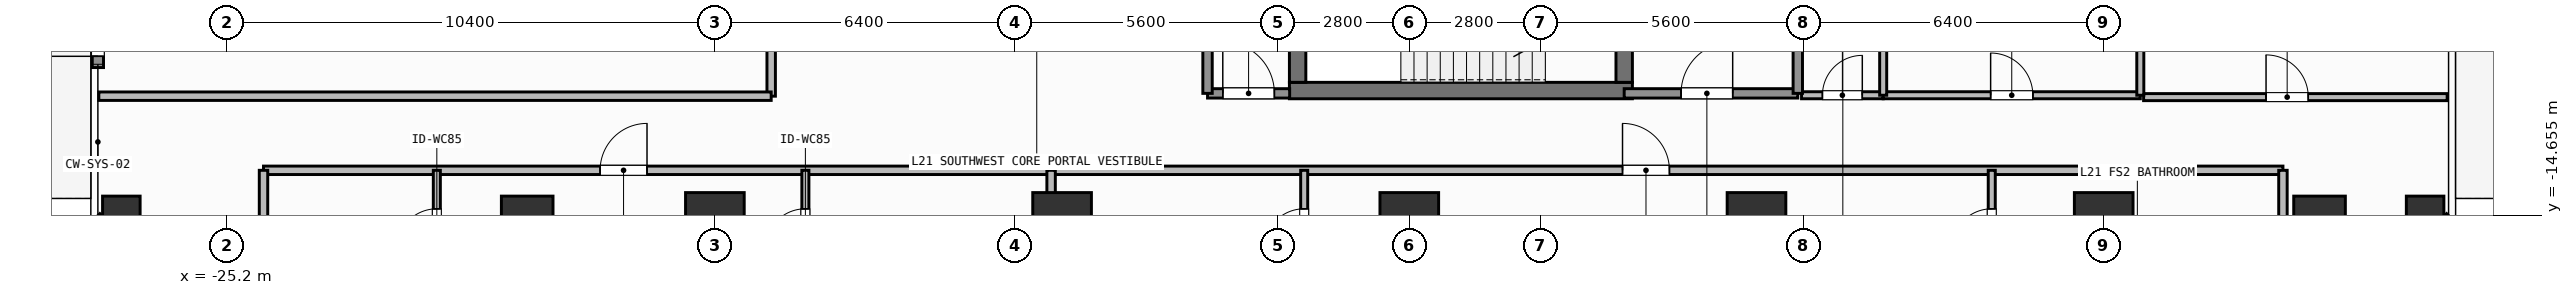
"""IFC4 building model, lengths in metres.
Left out: names, types, materials, properties, quantities, classifications, styles, units other than length and angle.
Written with IfcOpenShell. Run it as: python <this file> out.ifc"""

import sys

from ifc_helpers import new_model, si_unit, direction, frame, frame_2d, origin, origin_2d, place, context, subcontext, project, spatial, rectangle, hollow_rectangle, extrude, element, fill, save


model = new_model("IFC4")
c1 = context("Model", 3, precision=1e-05, world=origin(), true_north=direction((0.0, 1.0)))
c2 = subcontext(c1, "Body", "Model", "MODEL_VIEW")
j1 = project(units=[si_unit("LENGTHUNIT", "METRE"), si_unit("PLANEANGLEUNIT", "RADIAN")], contexts=[c1])
p1 = place(None, origin())
s1 = spatial("IfcSite", under=j1, at=p1, CompositionType="ELEMENT")
p2 = place(p1, origin())
s2 = spatial("IfcBuilding", under=s1, at=p2, CompositionType="ELEMENT")
p3 = place(p2, frame((0.0, 0.0, 85.2)))
s3 = spatial("IfcBuildingStorey", under=s2, at=p3, CompositionType="ELEMENT", Elevation=85.2)
p4 = place(p3, frame((-2.555, -12.0, 0.0), z_axis=(0.0, 0.0, 1.0), x_axis=(1.0, 0.0, 0.0)))
e1 = element("IfcWall", 1, at=p4, inside=s3, PredefinedType="SHEAR", context=c2, shape_type="SweptSolid", body=[
    extrude(rectangle(XDim=7.31, YDim=0.35, at=frame_2d((3.655, 0.0))), origin(), (0.0, 0.0, 1.0), 3.9),
])
p5 = place(p3, frame((-2.38, -11.825, 0.0), z_axis=(0.0, 0.0, 1.0), x_axis=(0.0, 1.0, 0.0)))
e2 = element("IfcWall", 2, at=p5, inside=s3, PredefinedType="SHEAR", context=c2, shape_type="SweptSolid", body=[
    extrude(rectangle(XDim=2.925, YDim=0.35, at=frame_2d((1.462, 0.0))), origin(), (0.0, 0.0, 1.0), 3.9),
])
p6 = place(p3, frame((4.58, -8.9, 0.0), z_axis=(0.0, 0.0, 1.0), x_axis=(0.0, -1.0, 0.0)))
e3 = element("IfcWall", 3, at=p6, inside=s3, PredefinedType="SHEAR", context=c2, shape_type="SweptSolid", body=[
    extrude(rectangle(XDim=2.925, YDim=0.35, at=frame_2d((1.462, 0.0))), origin(), (0.0, 0.0, 1.0), 3.9),
])
p7 = place(p6, frame((0.913, 0.0, 0.0)))
e4 = element("IfcOpeningElement", 4, at=p7, cuts=e3, PredefinedType="OPENING", context=c2, shape_type="SweptSolid", body=[
    extrude(rectangle(XDim=1.1, YDim=2.15, at=frame_2d((0.55, 1.075))), frame((0.0, 0.185, 0.0), z_axis=(0.0, -1.0, 0.0), x_axis=(1.0, 0.0, 0.0)), (0.0, 0.0, 1.0), 0.37),
])
for number, where, z_axis, x_axis in (
    (5, (-14.8, -14.8, 0.0), (0.0, 0.0, 1.0), (1.0, 0.0, 0.0)),
    (6, (-7.4, -14.8, 0.0), (0.0, 0.0, 1.0), (1.0, 0.0, 0.0)),
    (7, (0.0, -14.8, 0.0), (0.0, 0.0, 1.0), (1.0, 0.0, 0.0)),
    (8, (7.4, -14.8, 0.0), (0.0, 0.0, 1.0), (1.0, 0.0, 0.0)),
    (9, (14.8, -14.8, 0.0), (0.0, 0.0, 1.0), (1.0, 0.0, 0.0)),
):
    element("IfcColumn", number, at=place(p3, frame(where, z_axis=z_axis, x_axis=x_axis)), inside=s3, PredefinedType="COLUMN", context=c2, shape_type="SweptSolid", body=[
        extrude(rectangle(XDim=1.25, YDim=1.25, at=origin_2d()), origin(), (0.0, 0.0, 1.0), 3.9),
    ])
for number, where, z_axis, x_axis in (
    (10, (-18.8, -14.8, 0.0), (0.0, 0.0, 1.0), (1.0, 0.0, 0.0)),
    (11, (19.4, -14.8, 0.0), (0.0, 0.0, 1.0), (1.0, 0.0, 0.0)),
):
    element("IfcColumn", number, at=place(p3, frame(where, z_axis=z_axis, x_axis=x_axis)), inside=s3, PredefinedType="COLUMN", context=c2, shape_type="SweptSolid", body=[
        extrude(rectangle(XDim=1.1, YDim=1.1, at=origin_2d()), origin(), (0.0, 0.0, 1.0), 3.9),
    ])
for number, where, z_axis, x_axis in (
    (12, (-27.45, -14.65, 0.0), (0.0, 0.0, 1.0), (1.0, 0.0, 0.0)),
    (13, (21.65, -14.65, 0.0), (0.0, 0.0, 1.0), (1.0, 0.0, 0.0)),
):
    element("IfcColumn", number, at=place(p3, frame(where, z_axis=z_axis, x_axis=x_axis)), inside=s3, PredefinedType="COLUMN", context=c2, shape_type="SweptSolid", body=[
        extrude(hollow_rectangle(XDim=0.8, YDim=0.8, WallThickness=0.036, at=origin_2d()), origin(), (0.0, 0.0, 1.0), 3.9),
    ])
p8 = place(p3, frame((-27.95, -11.51, 0.0), z_axis=(0.0, 0.0, 1.0), x_axis=(0.0, 1.0, 0.0)))
e14 = element("IfcWall", 14, at=p8, inside=s3, PredefinedType="SOLIDWALL", context=c2, shape_type="SweptSolid", body=[
    extrude(rectangle(XDim=1.58, YDim=0.24, at=frame_2d((0.79, 0.0))), origin(), (0.0, 0.0, 1.0), 3.68),
])
p9 = place(p8, frame((0.24, 0.0, 0.0)))
e15 = element("IfcOpeningElement", 15, at=p9, cuts=e14, PredefinedType="OPENING", context=c2, shape_type="SweptSolid", body=[
    extrude(rectangle(XDim=1.1, YDim=2.2, at=frame_2d((0.55, 1.1))), frame((0.0, 0.13, 0.0), z_axis=(0.0, -1.0, 0.0), x_axis=(1.0, 0.0, 0.0)), (0.0, 0.0, 1.0), 0.26),
])
p10 = place(p3, frame((-23.408, -19.292, 0.0), z_axis=(0.0, 0.0, 1.0), x_axis=(-0.707087954376, 0.707125607496, 0.0)))
e16 = element("IfcWall", 16, at=p10, inside=s3, PredefinedType="SOLIDWALL", context=c2, shape_type="SweptSolid", body=[
    extrude(rectangle(XDim=6.484, YDim=0.24, at=frame_2d((3.242, 0.0))), origin(), (0.0, 0.0, 1.0), 3.68),
])
p11 = place(p10, frame((2.492, 0.0, 0.8)))
e17 = element("IfcOpeningElement", 17, at=p11, cuts=e16, PredefinedType="OPENING", context=c2, shape_type="SweptSolid", body=[
    extrude(rectangle(XDim=1.5, YDim=1.85, at=frame_2d((0.75, 0.925))), frame((0.0, 0.13, 0.0), z_axis=(0.0, -1.0, 0.0), x_axis=(1.0, 0.0, 0.0)), (0.0, 0.0, 1.0), 0.26),
])
p12 = place(p3, frame((22.192, -14.708, 0.0), z_axis=(0.0, 0.0, 1.0), x_axis=(-0.707087954376, -0.707125607496, 0.0)))
e18 = element("IfcWall", 18, at=p12, inside=s3, PredefinedType="SOLIDWALL", context=c2, shape_type="SweptSolid", body=[
    extrude(rectangle(XDim=6.484, YDim=0.24, at=frame_2d((3.242, 0.0))), origin(), (0.0, 0.0, 1.0), 3.68),
])
p13 = place(p12, frame((2.492, 0.0, 0.8)))
e19 = element("IfcOpeningElement", 19, at=p13, cuts=e18, PredefinedType="OPENING", context=c2, shape_type="SweptSolid", body=[
    extrude(rectangle(XDim=1.5, YDim=1.85, at=frame_2d((0.75, 0.925))), frame((0.0, 0.13, 0.0), z_axis=(0.0, -1.0, 0.0), x_axis=(1.0, 0.0, 0.0)), (0.0, 0.0, 1.0), 0.26),
])
p14 = place(p3, frame((4.58, -12.06, 0.0), z_axis=(0.0, 0.0, 1.0), x_axis=(1.0, 0.0, 0.0)))
e20 = element("IfcWall", 20, at=p14, inside=s3, PredefinedType="SOLIDWALL", context=c2, shape_type="SweptSolid", body=[
    extrude(rectangle(XDim=3.7, YDim=0.2, at=frame_2d((1.85, 0.0))), origin(), (0.0, 0.0, 1.0), 3.68),
])
p15 = place(p14, frame((1.212, 0.0, 0.0)))
e21 = element("IfcOpeningElement", 21, at=p15, cuts=e20, PredefinedType="OPENING", context=c2, shape_type="SweptSolid", body=[
    extrude(rectangle(XDim=1.1, YDim=2.15, at=frame_2d((0.55, 1.075))), frame((0.0, 0.11, 0.0), z_axis=(0.0, -1.0, 0.0), x_axis=(1.0, 0.0, 0.0)), (0.0, 0.0, 1.0), 0.22),
])
p16 = place(p3, frame((-4.3, -12.06, 0.0), z_axis=(0.0, 0.0, 1.0), x_axis=(1.0, 0.0, 0.0)))
e22 = element("IfcWall", 22, at=p16, inside=s3, PredefinedType="SOLIDWALL", context=c2, shape_type="SweptSolid", body=[
    extrude(rectangle(XDim=1.75, YDim=0.2, at=frame_2d((0.875, 0.0))), origin(), (0.0, 0.0, 1.0), 3.68),
])
p17 = place(p16, frame((0.325, 0.0, 0.0)))
e23 = element("IfcOpeningElement", 23, at=p17, cuts=e22, PredefinedType="OPENING", context=c2, shape_type="SweptSolid", body=[
    extrude(rectangle(XDim=1.1, YDim=2.15, at=frame_2d((0.55, 1.075))), frame((0.0, 0.11, 0.0), z_axis=(0.0, -1.0, 0.0), x_axis=(1.0, 0.0, 0.0)), (0.0, 0.0, 1.0), 0.22),
])
p18 = place(p3, frame((8.36, -12.1, 0.0), z_axis=(0.0, 0.0, 1.0), x_axis=(1.0, 0.0, 0.0)))
e24 = element("IfcWall", 24, at=p18, inside=s3, PredefinedType="PARTITIONING", context=c2, shape_type="SweptSolid", body=[
    extrude(rectangle(XDim=1.74, YDim=0.15, at=frame_2d((0.87, 0.0))), origin(), (0.0, 0.0, 1.0), 3.68),
])
p19 = place(p18, frame((0.445, 0.0, 0.0)))
e25 = element("IfcOpeningElement", 25, at=p19, cuts=e24, PredefinedType="OPENING", context=c2, shape_type="SweptSolid", body=[
    extrude(rectangle(XDim=0.85, YDim=2.1, at=frame_2d((0.425, 1.05))), frame((0.0, 0.085, 0.0), z_axis=(0.0, -1.0, 0.0), x_axis=(1.0, 0.0, 0.0)), (0.0, 0.0, 1.0), 0.17),
])
p20 = place(p3, frame((10.1, -12.1, 0.0), z_axis=(0.0, 0.0, 1.0), x_axis=(1.0, 0.0, 0.0)))
e26 = element("IfcWall", 26, at=p20, inside=s3, PredefinedType="PARTITIONING", context=c2, shape_type="SweptSolid", body=[
    extrude(rectangle(XDim=5.48, YDim=0.15, at=frame_2d((2.74, 0.0))), origin(), (0.0, 0.0, 1.0), 3.68),
])
p21 = place(p20, frame((2.29, 0.0, 0.0)))
e27 = element("IfcOpeningElement", 27, at=p21, cuts=e26, PredefinedType="OPENING", context=c2, shape_type="SweptSolid", body=[
    extrude(rectangle(XDim=0.9, YDim=2.1, at=frame_2d((0.45, 1.05))), frame((0.0, 0.085, 0.0), z_axis=(0.0, -1.0, 0.0), x_axis=(1.0, 0.0, 0.0)), (0.0, 0.0, 1.0), 0.17),
])
p22 = place(p3, frame((-24.42, -13.7, 0.0), z_axis=(0.0, 0.0, 1.0), x_axis=(1.0, 0.0, 0.0)))
e28 = element("IfcWall", 28, at=p22, inside=s3, PredefinedType="PARTITIONING", context=c2, shape_type="SweptSolid", body=[
    extrude(rectangle(XDim=16.786, YDim=0.18, at=frame_2d((8.393, 0.0))), origin(), (0.0, 0.0, 1.0), 3.68),
])
p23 = place(p22, frame((7.174, 0.0, 0.0)))
e29 = element("IfcOpeningElement", 29, at=p23, cuts=e28, PredefinedType="OPENING", context=c2, shape_type="SweptSolid", body=[
    extrude(rectangle(XDim=1.0, YDim=2.2, at=frame_2d((0.5, 1.1))), frame((0.0, 0.1, 0.0), z_axis=(0.0, -1.0, 0.0), x_axis=(1.0, 0.0, 0.0)), (0.0, 0.0, 1.0), 0.2),
])
p24 = place(p3, frame((-20.726, -16.19, 0.0), z_axis=(0.0, 0.0, 1.0), x_axis=(0.0, 1.0, 0.0)))
e30 = element("IfcWall", 30, at=p24, inside=s3, PredefinedType="PARTITIONING", context=c2, shape_type="SweptSolid", body=[
    extrude(rectangle(XDim=2.49, YDim=0.15, at=frame_2d((1.245, 0.0))), origin(), (0.0, 0.0, 1.0), 3.68),
])
p25 = place(p24, frame((0.82, 0.0, 0.0)))
e31 = element("IfcOpeningElement", 31, at=p25, cuts=e30, PredefinedType="OPENING", context=c2, shape_type="SweptSolid", body=[
    extrude(rectangle(XDim=0.85, YDim=2.1, at=frame_2d((0.425, 1.05))), frame((0.0, 0.085, 0.0), z_axis=(0.0, -1.0, 0.0), x_axis=(1.0, 0.0, 0.0)), (0.0, 0.0, 1.0), 0.17),
])
p26 = place(p3, frame((-12.871, -16.19, 0.0), z_axis=(0.0, 0.0, 1.0), x_axis=(0.0, 1.0, 0.0)))
e32 = element("IfcWall", 32, at=p26, inside=s3, PredefinedType="PARTITIONING", context=c2, shape_type="SweptSolid", body=[
    extrude(rectangle(XDim=2.49, YDim=0.15, at=frame_2d((1.245, 0.0))), origin(), (0.0, 0.0, 1.0), 3.68),
])
p27 = place(p26, frame((0.82, 0.0, 0.0)))
e33 = element("IfcOpeningElement", 33, at=p27, cuts=e32, PredefinedType="OPENING", context=c2, shape_type="SweptSolid", body=[
    extrude(rectangle(XDim=0.85, YDim=2.1, at=frame_2d((0.425, 1.05))), frame((0.0, 0.085, 0.0), z_axis=(0.0, -1.0, 0.0), x_axis=(1.0, 0.0, 0.0)), (0.0, 0.0, 1.0), 0.17),
])
p28 = place(p3, frame((-7.634, -13.7, 0.0), z_axis=(0.0, 0.0, 1.0), x_axis=(1.0, 0.0, 0.0)))
e34 = element("IfcWall", 34, at=p28, inside=s3, PredefinedType="PARTITIONING", context=c2, shape_type="SweptSolid", body=[
    extrude(rectangle(XDim=26.254, YDim=0.18, at=frame_2d((13.127, 0.0))), origin(), (0.0, 0.0, 1.0), 3.68),
])
p29 = place(p28, frame((12.178, 0.0, 0.0)))
e35 = element("IfcOpeningElement", 35, at=p29, cuts=e34, PredefinedType="OPENING", context=c2, shape_type="SweptSolid", body=[
    extrude(rectangle(XDim=1.0, YDim=2.2, at=frame_2d((0.5, 1.1))), frame((0.0, 0.1, 0.0), z_axis=(0.0, -1.0, 0.0), x_axis=(1.0, 0.0, 0.0)), (0.0, 0.0, 1.0), 0.2),
])
p30 = place(p3, frame((-2.24, -16.19, 0.0), z_axis=(0.0, 0.0, 1.0), x_axis=(0.0, 1.0, 0.0)))
e36 = element("IfcWall", 36, at=p30, inside=s3, PredefinedType="PARTITIONING", context=c2, shape_type="SweptSolid", body=[
    extrude(rectangle(XDim=2.49, YDim=0.15, at=frame_2d((1.245, 0.0))), origin(), (0.0, 0.0, 1.0), 3.68),
])
p31 = place(p30, frame((0.82, 0.0, 0.0)))
e37 = element("IfcOpeningElement", 37, at=p31, cuts=e36, PredefinedType="OPENING", context=c2, shape_type="SweptSolid", body=[
    extrude(rectangle(XDim=0.85, YDim=2.1, at=frame_2d((0.425, 1.05))), frame((0.0, 0.085, 0.0), z_axis=(0.0, -1.0, 0.0), x_axis=(1.0, 0.0, 0.0)), (0.0, 0.0, 1.0), 0.17),
])
p32 = place(p3, frame((12.414, -16.19, 0.0), z_axis=(0.0, 0.0, 1.0), x_axis=(0.0, 1.0, 0.0)))
e38 = element("IfcWall", 38, at=p32, inside=s3, PredefinedType="PARTITIONING", context=c2, shape_type="SweptSolid", body=[
    extrude(rectangle(XDim=2.49, YDim=0.15, at=frame_2d((1.245, 0.0))), origin(), (0.0, 0.0, 1.0), 3.68),
])
p33 = place(p32, frame((0.82, 0.0, 0.0)))
e39 = element("IfcOpeningElement", 39, at=p33, cuts=e38, PredefinedType="OPENING", context=c2, shape_type="SweptSolid", body=[
    extrude(rectangle(XDim=0.85, YDim=2.1, at=frame_2d((0.425, 1.05))), frame((0.0, 0.085, 0.0), z_axis=(0.0, -1.0, 0.0), x_axis=(1.0, 0.0, 0.0)), (0.0, 0.0, 1.0), 0.17),
])
p34 = place(p3, frame((-13.6, -12.12, 0.0), z_axis=(0.0, 0.0, 1.0), x_axis=(0.0, 1.0, 0.0)))
e40 = element("IfcWall", 40, at=p34, inside=s3, PredefinedType="PARTITIONING", context=c2, shape_type="SweptSolid", body=[
    extrude(rectangle(XDim=9.389, YDim=0.18, at=frame_2d((4.695, 0.0))), origin(), (0.0, 0.0, 1.0), 3.68),
])
p35 = place(p34, frame((1.415, 0.0, 0.0)))
e41 = element("IfcOpeningElement", 41, at=p35, cuts=e40, PredefinedType="OPENING", context=c2, shape_type="SweptSolid", body=[
    extrude(rectangle(XDim=1.0, YDim=2.2, at=frame_2d((0.5, 1.1))), frame((0.0, 0.1, 0.0), z_axis=(0.0, -1.0, 0.0), x_axis=(1.0, 0.0, 0.0)), (0.0, 0.0, 1.0), 0.2),
])
p36 = place(p3, frame((15.65, -12.14, 0.0), z_axis=(0.0, 0.0, 1.0), x_axis=(1.0, 0.0, 0.0)))
e42 = element("IfcWall", 42, at=p36, inside=s3, PredefinedType="PARTITIONING", context=c2, shape_type="SweptSolid", body=[
    extrude(rectangle(XDim=6.47, YDim=0.15, at=frame_2d((3.235, 0.0))), origin(), (0.0, 0.0, 1.0), 3.68),
])
p37 = place(p36, frame((2.61, 0.0, 0.0)))
e43 = element("IfcOpeningElement", 43, at=p37, cuts=e42, PredefinedType="OPENING", context=c2, shape_type="SweptSolid", body=[
    extrude(rectangle(XDim=0.9, YDim=2.1, at=frame_2d((0.45, 1.05))), frame((0.0, 0.085, 0.0), z_axis=(0.0, -1.0, 0.0), x_axis=(1.0, 0.0, 0.0)), (0.0, 0.0, 1.0), 0.17),
])
for number, where, z_axis, x_axis in (
    (44, (8.28, -12.06, 0.0), (0.0, 0.0, 1.0), (0.0, 1.0, 0.0)),
    (45, (-4.3, -12.06, 0.0), (0.0, 0.0, 1.0), (0.0, 1.0, 0.0)),
):
    element("IfcWall", number, at=place(p3, frame(where, z_axis=z_axis, x_axis=x_axis)), inside=s3, PredefinedType="SOLIDWALL", context=c2, shape_type="SweptSolid", body=[
        extrude(rectangle(XDim=3.185, YDim=0.2, at=frame_2d((1.593, 0.0))), origin(), (0.0, 0.0, 1.0), 3.68),
    ])
p38 = place(p3, frame((10.1, -12.1, 0.0), z_axis=(0.0, 0.0, 1.0), x_axis=(0.0, 1.0, 0.0)))
e46 = element("IfcWall", 46, at=p38, inside=s3, PredefinedType="PARTITIONING", context=c2, shape_type="SweptSolid", body=[
    extrude(rectangle(XDim=2.35, YDim=0.15, at=frame_2d((1.175, 0.0))), origin(), (0.0, 0.0, 1.0), 3.68),
])
p39 = place(p3, frame((15.58, -12.1, 0.0), z_axis=(0.0, 0.0, 1.0), x_axis=(0.0, 1.0, 0.0)))
e47 = element("IfcWall", 47, at=p39, inside=s3, PredefinedType="PARTITIONING", context=c2, shape_type="SweptSolid", body=[
    extrude(rectangle(XDim=6.25, YDim=0.15, at=frame_2d((3.125, 0.0))), origin(), (0.0, 0.0, 1.0), 3.68),
])
for number, where, z_axis, x_axis in (
    (48, (-24.42, -18.11, 0.0), (0.0, 0.0, 1.0), (0.0, 1.0, 0.0)),
    (49, (18.62, -18.11, 0.0), (0.0, 0.0, 1.0), (0.0, 1.0, 0.0)),
):
    element("IfcWall", number, at=place(p3, frame(where, z_axis=z_axis, x_axis=x_axis)), inside=s3, PredefinedType="PARTITIONING", context=c2, shape_type="SweptSolid", body=[
        extrude(rectangle(XDim=4.41, YDim=0.18, at=frame_2d((2.205, 0.0))), origin(), (0.0, 0.0, 1.0), 3.68),
    ])
p40 = place(p3, frame((-7.634, -19.23, 0.0), z_axis=(0.0, 0.0, 1.0), x_axis=(0.0, 1.0, 0.0)))
e50 = element("IfcWall", 50, at=p40, inside=s3, PredefinedType="PARTITIONING", context=c2, shape_type="SweptSolid", body=[
    extrude(rectangle(XDim=5.53, YDim=0.18, at=frame_2d((2.765, 0.0))), origin(), (0.0, 0.0, 1.0), 3.082),
])
p41 = place(p3, frame((-27.93, -12.12, 0.0), z_axis=(0.0, 0.0, 1.0), x_axis=(1.0, 0.0, 0.0)))
e51 = element("IfcWall", 51, at=p41, inside=s3, PredefinedType="PARTITIONING", context=c2, shape_type="SweptSolid", body=[
    extrude(rectangle(XDim=14.33, YDim=0.18, at=frame_2d((7.165, 0.0))), origin(), (0.0, 0.0, 1.0), 3.68),
])
p42 = place(p9, origin())
e52 = element("IfcDoor", 52, at=p42, inside=s3, OperationType="SINGLE_SWING_LEFT", PredefinedType="DOOR", context=c2, shape_type="SweptSolid", body=[
    extrude(rectangle(XDim=1.1, YDim=2.2, at=frame_2d((0.55, 1.1))), frame((0.0, 0.025, 0.0), z_axis=(0.0, -1.0, 0.0), x_axis=(1.0, 0.0, 0.0)), (0.0, 0.0, 1.0), 0.05),
])
fill(e15, e52)
p43 = place(p15, origin())
e53 = element("IfcDoor", 53, at=p43, inside=s3, OperationType="SINGLE_SWING_RIGHT", PredefinedType="DOOR", context=c2, shape_type="SweptSolid", body=[
    extrude(rectangle(XDim=1.1, YDim=2.15, at=frame_2d((0.55, 1.075))), frame((0.0, 0.025, 0.0), z_axis=(0.0, -1.0, 0.0), x_axis=(1.0, 0.0, 0.0)), (0.0, 0.0, 1.0), 0.05),
])
fill(e21, e53)
p44 = place(p17, origin())
e54 = element("IfcDoor", 54, at=p44, inside=s3, OperationType="SINGLE_SWING_LEFT", PredefinedType="DOOR", context=c2, shape_type="SweptSolid", body=[
    extrude(rectangle(XDim=1.1, YDim=2.15, at=frame_2d((0.55, 1.075))), frame((0.0, 0.025, 0.0), z_axis=(0.0, -1.0, 0.0), x_axis=(1.0, 0.0, 0.0)), (0.0, 0.0, 1.0), 0.05),
])
fill(e23, e54)
p45 = place(p19, origin())
e55 = element("IfcDoor", 55, at=p45, inside=s3, OperationType="SINGLE_SWING_RIGHT", PredefinedType="DOOR", context=c2, shape_type="SweptSolid", body=[
    extrude(rectangle(XDim=0.85, YDim=2.1, at=frame_2d((0.425, 1.05))), frame((0.0, 0.025, 0.0), z_axis=(0.0, -1.0, 0.0), x_axis=(1.0, 0.0, 0.0)), (0.0, 0.0, 1.0), 0.05),
])
fill(e25, e55)
p46 = place(p21, origin())
e56 = element("IfcDoor", 56, at=p46, inside=s3, OperationType="SINGLE_SWING_LEFT", PredefinedType="DOOR", context=c2, shape_type="SweptSolid", body=[
    extrude(rectangle(XDim=0.9, YDim=2.1, at=frame_2d((0.45, 1.05))), frame((0.0, 0.025, 0.0), z_axis=(0.0, -1.0, 0.0), x_axis=(1.0, 0.0, 0.0)), (0.0, 0.0, 1.0), 0.05),
])
fill(e27, e56)
p47 = place(p23, origin())
e57 = element("IfcDoor", 57, at=p47, inside=s3, OperationType="SINGLE_SWING_RIGHT", PredefinedType="DOOR", context=c2, shape_type="SweptSolid", body=[
    extrude(rectangle(XDim=1.0, YDim=2.2, at=frame_2d((0.5, 1.1))), frame((0.0, 0.025, 0.0), z_axis=(0.0, -1.0, 0.0), x_axis=(1.0, 0.0, 0.0)), (0.0, 0.0, 1.0), 0.05),
])
fill(e29, e57)
p48 = place(p25, origin())
e58 = element("IfcDoor", 58, at=p48, inside=s3, OperationType="SINGLE_SWING_LEFT", PredefinedType="DOOR", context=c2, shape_type="SweptSolid", body=[
    extrude(rectangle(XDim=0.85, YDim=2.1, at=frame_2d((0.425, 1.05))), frame((0.0, 0.025, 0.0), z_axis=(0.0, -1.0, 0.0), x_axis=(1.0, 0.0, 0.0)), (0.0, 0.0, 1.0), 0.05),
])
fill(e31, e58)
p49 = place(p27, origin())
e59 = element("IfcDoor", 59, at=p49, inside=s3, OperationType="SINGLE_SWING_LEFT", PredefinedType="DOOR", context=c2, shape_type="SweptSolid", body=[
    extrude(rectangle(XDim=0.85, YDim=2.1, at=frame_2d((0.425, 1.05))), frame((0.0, 0.025, 0.0), z_axis=(0.0, -1.0, 0.0), x_axis=(1.0, 0.0, 0.0)), (0.0, 0.0, 1.0), 0.05),
])
fill(e33, e59)
p50 = place(p29, origin())
e60 = element("IfcDoor", 60, at=p50, inside=s3, OperationType="SINGLE_SWING_LEFT", PredefinedType="DOOR", context=c2, shape_type="SweptSolid", body=[
    extrude(rectangle(XDim=1.0, YDim=2.2, at=frame_2d((0.5, 1.1))), frame((0.0, 0.025, 0.0), z_axis=(0.0, -1.0, 0.0), x_axis=(1.0, 0.0, 0.0)), (0.0, 0.0, 1.0), 0.05),
])
fill(e35, e60)
p51 = place(p31, origin())
e61 = element("IfcDoor", 61, at=p51, inside=s3, OperationType="SINGLE_SWING_LEFT", PredefinedType="DOOR", context=c2, shape_type="SweptSolid", body=[
    extrude(rectangle(XDim=0.85, YDim=2.1, at=frame_2d((0.425, 1.05))), frame((0.0, 0.025, 0.0), z_axis=(0.0, -1.0, 0.0), x_axis=(1.0, 0.0, 0.0)), (0.0, 0.0, 1.0), 0.05),
])
fill(e37, e61)
p52 = place(p33, origin())
e62 = element("IfcDoor", 62, at=p52, inside=s3, OperationType="SINGLE_SWING_LEFT", PredefinedType="DOOR", context=c2, shape_type="SweptSolid", body=[
    extrude(rectangle(XDim=0.85, YDim=2.1, at=frame_2d((0.425, 1.05))), frame((0.0, 0.025, 0.0), z_axis=(0.0, -1.0, 0.0), x_axis=(1.0, 0.0, 0.0)), (0.0, 0.0, 1.0), 0.05),
])
fill(e39, e62)
p53 = place(p37, origin())
e63 = element("IfcDoor", 63, at=p53, inside=s3, OperationType="SINGLE_SWING_LEFT", PredefinedType="DOOR", context=c2, shape_type="SweptSolid", body=[
    extrude(rectangle(XDim=0.9, YDim=2.1, at=frame_2d((0.45, 1.05))), frame((0.0, 0.025, 0.0), z_axis=(0.0, -1.0, 0.0), x_axis=(1.0, 0.0, 0.0)), (0.0, 0.0, 1.0), 0.05),
])
fill(e43, e63)
save(model, sys.argv[1])
